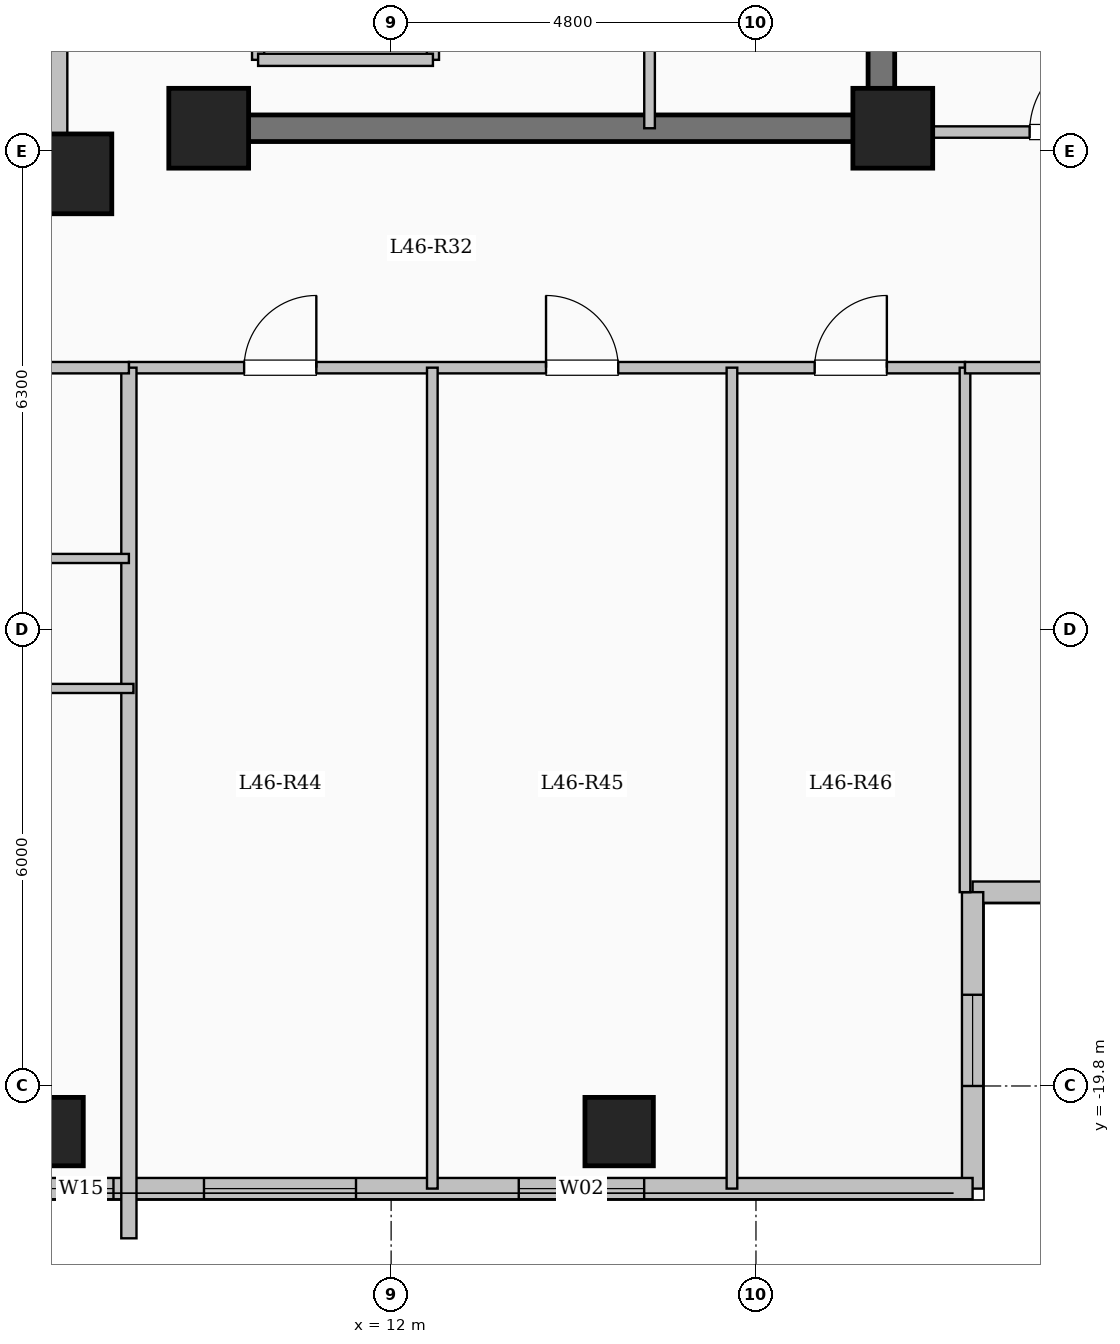
"""IFC4 building model, lengths in metres.
Left out: names, types, materials, properties, quantities, classifications, styles, units other than length and angle.
Written with IfcOpenShell. Run it as: python <this file> out.ifc"""

import sys

from ifc_helpers import new_model, si_unit, direction, frame, frame_2d, origin, origin_2d, place, context, subcontext, project, spatial, rectangle, extrude, element, fill, save


model = new_model("IFC4")
c1 = context("Model", 3, precision=1e-05, world=origin(), true_north=direction((0.0, 1.0)))
c2 = subcontext(c1, "Body", "Model", "MODEL_VIEW")
j1 = project(units=[si_unit("LENGTHUNIT", "METRE"), si_unit("PLANEANGLEUNIT", "RADIAN")], contexts=[c1])
p1 = place(None, origin())
s1 = spatial("IfcSite", under=j1, at=p1, CompositionType="ELEMENT")
p2 = place(p1, origin())
s2 = spatial("IfcBuilding", under=s1, at=p2, CompositionType="ELEMENT")
p3 = place(p2, frame((0.0, 0.0, 169.45)))
s3 = spatial("IfcBuildingStorey", under=s2, at=p3, CompositionType="ELEMENT", Elevation=169.45)
for number, where, z_axis, x_axis in (
    (1, (7.8, -7.8, 0.0), (0.0, 0.0, 1.0), (1.0, 0.0, 0.0)),
    (2, (9.6, -7.2, 0.0), (0.0, 0.0, 1.0), (1.0, 0.0, 0.0)),
    (3, (18.6, -7.2, 0.0), (0.0, 0.0, 1.0), (1.0, 0.0, 0.0)),
):
    element("IfcColumn", number, at=place(p3, frame(where, z_axis=z_axis, x_axis=x_axis)), inside=s3, PredefinedType="COLUMN", context=c2, shape_type="SweptSolid", body=[
        extrude(rectangle(XDim=1.05, YDim=1.05, at=origin_2d()), origin(), (0.0, 0.0, 1.0), 3.35),
    ])
for number, where, z_axis, x_axis in (
    (4, (7.5, -20.4, 0.0), (0.0, 0.0, 1.0), (1.0, 0.0, 0.0)),
    (5, (15.0, -20.4, 0.0), (0.0, 0.0, 1.0), (1.0, 0.0, 0.0)),
):
    element("IfcColumn", number, at=place(p3, frame(where, z_axis=z_axis, x_axis=x_axis)), inside=s3, PredefinedType="COLUMN", context=c2, shape_type="SweptSolid", body=[
        extrude(rectangle(XDim=0.9, YDim=0.9, at=origin_2d()), origin(), (0.0, 0.0, 1.0), 3.35),
    ])
p4 = place(p3, frame((-7.62, -7.62, 0.0), z_axis=(0.0, 0.0, 1.0), x_axis=(1.0, 0.0, 0.0)))
e6 = element("IfcWall", 6, at=p4, inside=s3, PredefinedType="SOLIDWALL", context=c2, shape_type="SweptSolid", body=[
    extrude(rectangle(XDim=15.24, YDim=0.24, at=frame_2d((7.62, 0.0))), origin(), (0.0, 0.0, 1.0), 3.05),
])
p5 = place(p4, frame((6.92, 0.0, 0.95)))
e7 = element("IfcOpeningElement", 7, at=p5, cuts=e6, PredefinedType="OPENING", context=c2, shape_type="SweptSolid", body=[
    extrude(rectangle(XDim=1.4, YDim=1.5, at=frame_2d((0.7, 0.75))), frame((0.0, 0.13, 0.0), z_axis=(0.0, -1.0, 0.0), x_axis=(1.0, 0.0, 0.0)), (0.0, 0.0, 1.0), 0.26),
])
p6 = place(p3, frame((7.62, -7.62, 0.0), z_axis=(0.0, 0.0, 1.0), x_axis=(0.0, 1.0, 0.0)))
e8 = element("IfcWall", 8, at=p6, inside=s3, PredefinedType="SOLIDWALL", context=c2, shape_type="SweptSolid", body=[
    extrude(rectangle(XDim=15.24, YDim=0.24, at=frame_2d((7.62, 0.0))), origin(), (0.0, 0.0, 1.0), 3.05),
])
p7 = place(p6, frame((6.92, 0.0, 0.95)))
e9 = element("IfcOpeningElement", 9, at=p7, cuts=e8, PredefinedType="OPENING", context=c2, shape_type="SweptSolid", body=[
    extrude(rectangle(XDim=1.4, YDim=1.5, at=frame_2d((0.7, 0.75))), frame((0.0, 0.13, 0.0), z_axis=(0.0, -1.0, 0.0), x_axis=(1.0, 0.0, 0.0)), (0.0, 0.0, 1.0), 0.26),
])
p8 = place(p3, frame((25.05, -17.25, 0.0), z_axis=(0.0, 0.0, 1.0), x_axis=(-1.0, 0.0, 0.0)))
e10 = element("IfcWall", 10, at=p8, inside=s3, PredefinedType="SOLIDWALL", context=c2, shape_type="SweptSolid", body=[
    extrude(rectangle(XDim=5.4, YDim=0.28, at=frame_2d((2.7, 0.0))), origin(), (0.0, 0.0, 1.0), 3.05),
])
p9 = place(p8, frame((1.625, 0.0, 0.9)))
e11 = element("IfcOpeningElement", 11, at=p9, cuts=e10, PredefinedType="OPENING", context=c2, shape_type="SweptSolid", body=[
    extrude(rectangle(XDim=2.2, YDim=1.75, at=frame_2d((1.1, 0.875))), frame((0.0, 0.15, 0.0), z_axis=(0.0, -1.0, 0.0), x_axis=(1.0, 0.0, 0.0)), (0.0, 0.0, 1.0), 0.3),
])
p10 = place(p3, frame((19.65, -17.25, 0.0), z_axis=(0.0, 0.0, 1.0), x_axis=(0.0, -1.0, 0.0)))
e12 = element("IfcWall", 12, at=p10, inside=s3, PredefinedType="SOLIDWALL", context=c2, shape_type="SweptSolid", body=[
    extrude(rectangle(XDim=3.9, YDim=0.28, at=frame_2d((1.95, 0.0))), origin(), (0.0, 0.0, 1.0), 3.05),
])
p11 = place(p10, frame((1.35, 0.0, 0.95)))
e13 = element("IfcOpeningElement", 13, at=p11, cuts=e12, PredefinedType="OPENING", context=c2, shape_type="SweptSolid", body=[
    extrude(rectangle(XDim=1.2, YDim=1.5, at=frame_2d((0.6, 0.75))), frame((0.0, 0.15, 0.0), z_axis=(0.0, -1.0, 0.0), x_axis=(1.0, 0.0, 0.0)), (0.0, 0.0, 1.0), 0.3),
])
p12 = place(p3, frame((19.65, -21.15, 0.0), z_axis=(0.0, 0.0, 1.0), x_axis=(-1.0, 0.0, 0.0)))
e14 = element("IfcWall", 14, at=p12, inside=s3, PredefinedType="SOLIDWALL", context=c2, shape_type="SweptSolid", body=[
    extrude(rectangle(XDim=12.3, YDim=0.28, at=frame_2d((6.15, 0.0))), origin(), (0.0, 0.0, 1.0), 3.05),
])
p13 = place(p12, frame((4.321, 0.0, 0.9)))
e15 = element("IfcOpeningElement", 15, at=p13, cuts=e14, PredefinedType="OPENING", context=c2, shape_type="SweptSolid", body=[
    extrude(rectangle(XDim=1.65, YDim=1.6, at=frame_2d((0.825, 0.8))), frame((0.0, 0.15, 0.0), z_axis=(0.0, -1.0, 0.0), x_axis=(1.0, 0.0, 0.0)), (0.0, 0.0, 1.0), 0.3),
])
p14 = place(p12, frame((8.112, 0.0, 0.9)))
e16 = element("IfcOpeningElement", 16, at=p14, cuts=e14, PredefinedType="OPENING", context=c2, shape_type="SweptSolid", body=[
    extrude(rectangle(XDim=2.0, YDim=1.7, at=frame_2d((1.0, 0.85))), frame((0.0, 0.15, 0.0), z_axis=(0.0, -1.0, 0.0), x_axis=(1.0, 0.0, 0.0)), (0.0, 0.0, 1.0), 0.3),
])
p15 = place(p12, frame((11.303, 0.0, 0.95)))
e17 = element("IfcOpeningElement", 17, at=p15, cuts=e14, PredefinedType="OPENING", context=c2, shape_type="SweptSolid", body=[
    extrude(rectangle(XDim=0.85, YDim=1.5, at=frame_2d((0.425, 0.75))), frame((0.0, 0.15, 0.0), z_axis=(0.0, -1.0, 0.0), x_axis=(1.0, 0.0, 0.0)), (0.0, 0.0, 1.0), 0.3),
])
p16 = place(p3, frame((10.25, -6.3, 0.0), z_axis=(0.0, 0.0, 1.0), x_axis=(0.0, 1.0, 0.0)))
e18 = element("IfcWall", 18, at=p16, inside=s3, PredefinedType="SOLIDWALL", context=c2, shape_type="SweptSolid", body=[
    extrude(rectangle(XDim=2.6, YDim=0.16, at=frame_2d((1.3, 0.0))), origin(), (0.0, 0.0, 1.0), 3.05),
])
p17 = place(p16, frame((0.75, 0.0, 0.0)))
e19 = element("IfcOpeningElement", 19, at=p17, cuts=e18, PredefinedType="OPENING", context=c2, shape_type="SweptSolid", body=[
    extrude(rectangle(XDim=1.1, YDim=2.15, at=frame_2d((0.55, 1.075))), frame((0.0, 0.09, 0.0), z_axis=(0.0, -1.0, 0.0), x_axis=(1.0, 0.0, 0.0)), (0.0, 0.0, 1.0), 0.18),
])
p18 = place(p3, frame((12.55, -6.3, 0.0), z_axis=(0.0, 0.0, 1.0), x_axis=(0.0, 1.0, 0.0)))
e20 = element("IfcWall", 20, at=p18, inside=s3, PredefinedType="SOLIDWALL", context=c2, shape_type="SweptSolid", body=[
    extrude(rectangle(XDim=2.6, YDim=0.16, at=frame_2d((1.3, 0.0))), origin(), (0.0, 0.0, 1.0), 3.05),
])
p19 = place(p3, frame((10.25, -6.3, 0.0), z_axis=(0.0, 0.0, 1.0), x_axis=(1.0, 0.0, 0.0)))
e21 = element("IfcWall", 21, at=p19, inside=s3, PredefinedType="SOLIDWALL", context=c2, shape_type="SweptSolid", body=[
    extrude(rectangle(XDim=2.3, YDim=0.16, at=frame_2d((1.15, 0.0))), origin(), (0.0, 0.0, 1.0), 3.05),
])
p20 = place(p3, frame((18.45, -7.375, 0.0), z_axis=(0.0, 0.0, 1.0), x_axis=(0.0, 1.0, 0.0)))
e22 = element("IfcWall", 22, at=p20, inside=s3, PredefinedType="SHEAR", context=c2, shape_type="SweptSolid", body=[
    extrude(rectangle(XDim=14.05, YDim=0.35, at=frame_2d((7.025, 0.0))), origin(), (0.0, 0.0, 1.0), 3.35),
])
p21 = place(p3, frame((10.075, -7.2, 0.0), z_axis=(0.0, 0.0, 1.0), x_axis=(1.0, 0.0, 0.0)))
e23 = element("IfcWall", 23, at=p21, inside=s3, PredefinedType="SHEAR", context=c2, shape_type="SweptSolid", body=[
    extrude(rectangle(XDim=8.55, YDim=0.35, at=frame_2d((4.275, 0.0))), origin(), (0.0, 0.0, 1.0), 3.35),
])
p22 = place(p3, frame((15.4, -7.2, 0.0), z_axis=(0.0, 0.0, 1.0), x_axis=(0.0, 1.0, 0.0)))
e24 = element("IfcWall", 24, at=p22, inside=s3, PredefinedType="PARTITIONING", context=c2, shape_type="SweptSolid", body=[
    extrude(rectangle(XDim=10.45, YDim=0.14, at=frame_2d((5.225, 0.0))), origin(), (0.0, 0.0, 1.0), 3.05),
])
p23 = place(p22, frame((9.25, 0.0, 0.0)))
e25 = element("IfcOpeningElement", 25, at=p23, cuts=e24, PredefinedType="OPENING", context=c2, shape_type="SweptSolid", body=[
    extrude(rectangle(XDim=0.9, YDim=2.08, at=frame_2d((0.45, 1.04))), frame((0.0, 0.08, 0.0), z_axis=(0.0, -1.0, 0.0), x_axis=(1.0, 0.0, 0.0)), (0.0, 0.0, 1.0), 0.16),
])
p24 = place(p3, frame((8.55, -10.35, 0.0), z_axis=(0.0, 0.0, 1.0), x_axis=(1.0, 0.0, 0.0)))
e26 = element("IfcWall", 26, at=p24, inside=s3, PredefinedType="PARTITIONING", context=c2, shape_type="SweptSolid", body=[
    extrude(rectangle(XDim=11.0, YDim=0.15, at=frame_2d((5.5, 0.0))), origin(), (0.0, 0.0, 1.0), 3.05),
])
p25 = place(p24, frame((1.516, 0.0, 0.0)))
e27 = element("IfcOpeningElement", 27, at=p25, cuts=e26, PredefinedType="OPENING", context=c2, shape_type="SweptSolid", body=[
    extrude(rectangle(XDim=0.95, YDim=2.15, at=frame_2d((0.475, 1.075))), frame((0.0, 0.085, 0.0), z_axis=(0.0, -1.0, 0.0), x_axis=(1.0, 0.0, 0.0)), (0.0, 0.0, 1.0), 0.17),
])
p26 = place(p24, frame((5.488, 0.0, 0.0)))
e28 = element("IfcOpeningElement", 28, at=p26, cuts=e26, PredefinedType="OPENING", context=c2, shape_type="SweptSolid", body=[
    extrude(rectangle(XDim=0.95, YDim=2.15, at=frame_2d((0.475, 1.075))), frame((0.0, 0.085, 0.0), z_axis=(0.0, -1.0, 0.0), x_axis=(1.0, 0.0, 0.0)), (0.0, 0.0, 1.0), 0.17),
])
p27 = place(p24, frame((9.022, 0.0, 0.0)))
e29 = element("IfcOpeningElement", 29, at=p27, cuts=e26, PredefinedType="OPENING", context=c2, shape_type="SweptSolid", body=[
    extrude(rectangle(XDim=0.95, YDim=2.15, at=frame_2d((0.475, 1.075))), frame((0.0, 0.085, 0.0), z_axis=(0.0, -1.0, 0.0), x_axis=(1.0, 0.0, 0.0)), (0.0, 0.0, 1.0), 0.17),
])
for number, where, z_axis, x_axis in (
    (30, (12.542, -21.15, 0.0), (0.0, 0.0, 1.0), (0.0, 1.0, 0.0)),
    (31, (16.484, -21.15, 0.0), (0.0, 0.0, 1.0), (0.0, 1.0, 0.0)),
):
    element("IfcWall", number, at=place(p3, frame(where, z_axis=z_axis, x_axis=x_axis)), inside=s3, PredefinedType="PARTITIONING", context=c2, shape_type="SweptSolid", body=[
        extrude(rectangle(XDim=10.8, YDim=0.14, at=frame_2d((5.4, 0.0))), origin(), (0.0, 0.0, 1.0), 3.05),
    ])
p28 = place(p3, frame((8.55, -21.804, 0.0), z_axis=(0.0, 0.0, 1.0), x_axis=(0.0, 1.0, 0.0)))
e32 = element("IfcWall", 32, at=p28, inside=s3, PredefinedType="SOLIDWALL", context=c2, shape_type="SweptSolid", body=[
    extrude(rectangle(XDim=11.454, YDim=0.2, at=frame_2d((5.727, 0.0))), origin(), (0.0, 0.0, 1.0), 3.05),
])
p29 = place(p3, frame((-8.55, -10.35, 0.0), z_axis=(0.0, 0.0, 1.0), x_axis=(1.0, 0.0, 0.0)))
e33 = element("IfcWall", 33, at=p29, inside=s3, PredefinedType="PARTITIONING", context=c2, shape_type="SweptSolid", body=[
    extrude(rectangle(XDim=17.1, YDim=0.15, at=frame_2d((8.55, 0.0))), origin(), (0.0, 0.0, 1.0), 3.05),
])
p30 = place(p29, frame((1.6, 0.0, 0.0)))
e34 = element("IfcOpeningElement", 34, at=p30, cuts=e33, PredefinedType="OPENING", context=c2, shape_type="SweptSolid", body=[
    extrude(rectangle(XDim=0.96, YDim=2.15, at=frame_2d((0.48, 1.075))), frame((0.0, 0.085, 0.0), z_axis=(0.0, -1.0, 0.0), x_axis=(1.0, 0.0, 0.0)), (0.0, 0.0, 1.0), 0.17),
])
p31 = place(p3, frame((4.097, -12.86, 0.0), z_axis=(0.0, 0.0, 1.0), x_axis=(1.0, 0.0, 0.0)))
e35 = element("IfcWall", 35, at=p31, inside=s3, PredefinedType="PARTITIONING", context=c2, shape_type="SweptSolid", body=[
    extrude(rectangle(XDim=4.453, YDim=0.12, at=frame_2d((2.227, 0.0))), origin(), (0.0, 0.0, 1.0), 3.05),
])
p32 = place(p31, frame((1.787, 0.0, 0.0)))
e36 = element("IfcOpeningElement", 36, at=p32, cuts=e35, PredefinedType="OPENING", context=c2, shape_type="SweptSolid", body=[
    extrude(rectangle(XDim=0.88, YDim=2.1, at=frame_2d((0.44, 1.05))), frame((0.0, 0.07, 0.0), z_axis=(0.0, -1.0, 0.0), x_axis=(1.0, 0.0, 0.0)), (0.0, 0.0, 1.0), 0.14),
])
p33 = place(p3, frame((-0.905, -14.57, 0.0), z_axis=(0.0, 0.0, 1.0), x_axis=(1.0, 0.0, 0.0)))
e37 = element("IfcWall", 37, at=p33, inside=s3, PredefinedType="PARTITIONING", context=c2, shape_type="SweptSolid", body=[
    extrude(rectangle(XDim=9.515, YDim=0.12, at=frame_2d((4.758, 0.0))), origin(), (0.0, 0.0, 1.0), 3.05),
])
p34 = place(p33, frame((1.891, 0.0, 0.0)))
e38 = element("IfcOpeningElement", 38, at=p34, cuts=e37, PredefinedType="OPENING", context=c2, shape_type="SweptSolid", body=[
    extrude(rectangle(XDim=0.88, YDim=2.1, at=frame_2d((0.44, 1.05))), frame((0.0, 0.07, 0.0), z_axis=(0.0, -1.0, 0.0), x_axis=(1.0, 0.0, 0.0)), (0.0, 0.0, 1.0), 0.14),
])
p35 = place(p33, frame((6.554, 0.0, 0.0)))
e39 = element("IfcOpeningElement", 39, at=p35, cuts=e37, PredefinedType="OPENING", context=c2, shape_type="SweptSolid", body=[
    extrude(rectangle(XDim=0.88, YDim=2.1, at=frame_2d((0.44, 1.05))), frame((0.0, 0.07, 0.0), z_axis=(0.0, -1.0, 0.0), x_axis=(1.0, 0.0, 0.0)), (0.0, 0.0, 1.0), 0.14),
])
p36 = place(p3, frame((18.45, -7.25, 0.0), z_axis=(0.0, 0.0, 1.0), x_axis=(1.0, 0.0, 0.0)))
e40 = element("IfcWall", 40, at=p36, inside=s3, PredefinedType="PARTITIONING", context=c2, shape_type="SweptSolid", body=[
    extrude(rectangle(XDim=6.63, YDim=0.15, at=frame_2d((3.315, 0.0))), origin(), (0.0, 0.0, 1.0), 3.05),
])
p37 = place(p36, frame((1.95, 0.0, 0.0)))
e41 = element("IfcOpeningElement", 41, at=p37, cuts=e40, PredefinedType="OPENING", context=c2, shape_type="SweptSolid", body=[
    extrude(rectangle(XDim=1.08, YDim=2.15, at=frame_2d((0.54, 1.075))), frame((0.0, 0.085, 0.0), z_axis=(0.0, -1.0, 0.0), x_axis=(1.0, 0.0, 0.0)), (0.0, 0.0, 1.0), 0.17),
])
p38 = place(p3, frame((19.55, -17.25, 0.0), z_axis=(0.0, 0.0, 1.0), x_axis=(0.0, 1.0, 0.0)))
e42 = element("IfcWall", 42, at=p38, inside=s3, PredefinedType="PARTITIONING", context=c2, shape_type="SweptSolid", body=[
    extrude(rectangle(XDim=6.9, YDim=0.14, at=frame_2d((3.45, 0.0))), origin(), (0.0, 0.0, 1.0), 3.05),
])
p39 = place(p3, frame((19.55, -10.35, 0.0), z_axis=(0.0, 0.0, 1.0), x_axis=(1.0, 0.0, 0.0)))
e43 = element("IfcWall", 43, at=p39, inside=s3, PredefinedType="PARTITIONING", context=c2, shape_type="SweptSolid", body=[
    extrude(rectangle(XDim=5.53, YDim=0.15, at=frame_2d((2.765, 0.0))), origin(), (0.0, 0.0, 1.0), 3.05),
])
p40 = place(p39, frame((2.29, 0.0, 0.0)))
e44 = element("IfcOpeningElement", 44, at=p40, cuts=e43, PredefinedType="OPENING", context=c2, shape_type="SweptSolid", body=[
    extrude(rectangle(XDim=0.95, YDim=2.15, at=frame_2d((0.475, 1.075))), frame((0.0, 0.085, 0.0), z_axis=(0.0, -1.0, 0.0), x_axis=(1.0, 0.0, 0.0)), (0.0, 0.0, 1.0), 0.17),
])
p41 = place(p11, origin())
e45 = element("IfcWindow", 45, at=p41, inside=s3, PartitioningType="SINGLE_PANEL", PredefinedType="WINDOW", context=c2, shape_type="SweptSolid", body=[
    extrude(rectangle(XDim=1.2, YDim=1.5, at=frame_2d((0.6, 0.75))), frame((0.0, 0.03, 0.0), z_axis=(0.0, -1.0, 0.0), x_axis=(1.0, 0.0, 0.0)), (0.0, 0.0, 1.0), 0.06),
])
fill(e13, e45)
p42 = place(p13, origin())
e46 = element("IfcWindow", 46, at=p42, inside=s3, PartitioningType="SINGLE_PANEL", PredefinedType="WINDOW", context=c2, shape_type="SweptSolid", body=[
    extrude(rectangle(XDim=1.65, YDim=1.6, at=frame_2d((0.825, 0.8))), frame((0.0, 0.03, 0.0), z_axis=(0.0, -1.0, 0.0), x_axis=(1.0, 0.0, 0.0)), (0.0, 0.0, 1.0), 0.06),
])
fill(e15, e46)
p43 = place(p14, origin())
e47 = element("IfcWindow", 47, at=p43, inside=s3, PartitioningType="SINGLE_PANEL", PredefinedType="WINDOW", context=c2, shape_type="SweptSolid", body=[
    extrude(rectangle(XDim=2.0, YDim=1.7, at=frame_2d((1.0, 0.85))), frame((0.0, 0.03, 0.0), z_axis=(0.0, -1.0, 0.0), x_axis=(1.0, 0.0, 0.0)), (0.0, 0.0, 1.0), 0.06),
])
fill(e16, e47)
p44 = place(p15, origin())
e48 = element("IfcWindow", 48, at=p44, inside=s3, PartitioningType="SINGLE_PANEL", PredefinedType="WINDOW", context=c2, shape_type="SweptSolid", body=[
    extrude(rectangle(XDim=0.85, YDim=1.5, at=frame_2d((0.425, 0.75))), frame((0.0, 0.03, 0.0), z_axis=(0.0, -1.0, 0.0), x_axis=(1.0, 0.0, 0.0)), (0.0, 0.0, 1.0), 0.06),
])
fill(e17, e48)
p45 = place(p25, origin())
e49 = element("IfcDoor", 49, at=p45, inside=s3, OperationType="SINGLE_SWING_RIGHT", PredefinedType="DOOR", context=c2, shape_type="SweptSolid", body=[
    extrude(rectangle(XDim=0.95, YDim=2.15, at=frame_2d((0.475, 1.075))), frame((0.0, 0.025, 0.0), z_axis=(0.0, -1.0, 0.0), x_axis=(1.0, 0.0, 0.0)), (0.0, 0.0, 1.0), 0.05),
])
fill(e27, e49)
p46 = place(p26, origin())
e50 = element("IfcDoor", 50, at=p46, inside=s3, OperationType="SINGLE_SWING_LEFT", PredefinedType="DOOR", context=c2, shape_type="SweptSolid", body=[
    extrude(rectangle(XDim=0.95, YDim=2.15, at=frame_2d((0.475, 1.075))), frame((0.0, 0.025, 0.0), z_axis=(0.0, -1.0, 0.0), x_axis=(1.0, 0.0, 0.0)), (0.0, 0.0, 1.0), 0.05),
])
fill(e28, e50)
p47 = place(p27, origin())
e51 = element("IfcDoor", 51, at=p47, inside=s3, OperationType="SINGLE_SWING_RIGHT", PredefinedType="DOOR", context=c2, shape_type="SweptSolid", body=[
    extrude(rectangle(XDim=0.95, YDim=2.15, at=frame_2d((0.475, 1.075))), frame((0.0, 0.025, 0.0), z_axis=(0.0, -1.0, 0.0), x_axis=(1.0, 0.0, 0.0)), (0.0, 0.0, 1.0), 0.05),
])
fill(e29, e51)
p48 = place(p37, origin())
e52 = element("IfcDoor", 52, at=p48, inside=s3, OperationType="SINGLE_SWING_RIGHT", PredefinedType="DOOR", context=c2, shape_type="SweptSolid", body=[
    extrude(rectangle(XDim=1.08, YDim=2.15, at=frame_2d((0.54, 1.075))), frame((0.0, 0.025, 0.0), z_axis=(0.0, -1.0, 0.0), x_axis=(1.0, 0.0, 0.0)), (0.0, 0.0, 1.0), 0.05),
])
fill(e41, e52)
save(model, sys.argv[1])
